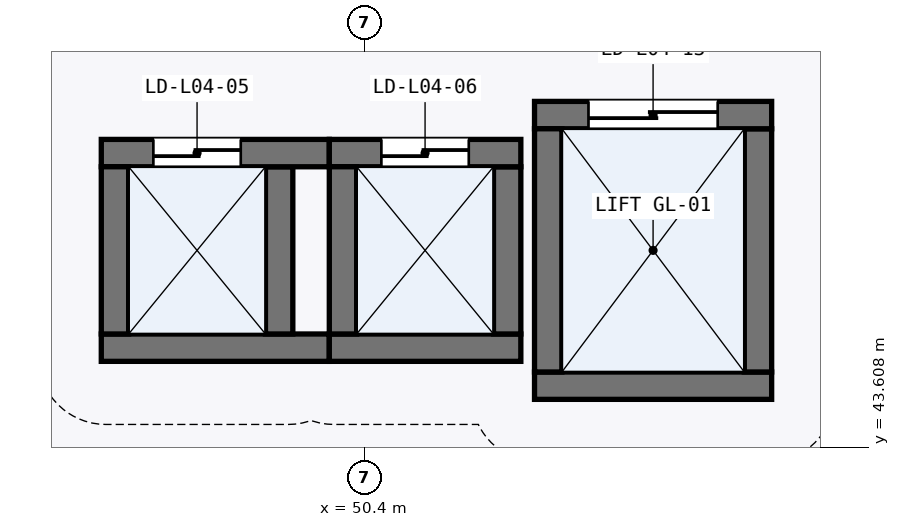
"""IFC4 building model, lengths in metres.
Left out: names, types, materials, properties, quantities, classifications, styles, units other than length and angle.
Written with IfcOpenShell. Run it as: python <this file> out.ifc"""

import sys

from ifc_helpers import new_model, si_unit, direction, frame, frame_2d, origin, place, context, subcontext, project, spatial, rectangle, extrude, element, fill, save


model = new_model("IFC4")
c1 = context("Model", 3, precision=1e-05, world=origin(), true_north=direction((0.0, 1.0)))
c2 = subcontext(c1, "Body", "Model", "MODEL_VIEW")
j1 = project(units=[si_unit("LENGTHUNIT", "METRE"), si_unit("PLANEANGLEUNIT", "RADIAN")], contexts=[c1])
p1 = place(None, origin())
s1 = spatial("IfcSite", under=j1, at=p1, CompositionType="ELEMENT")
p2 = place(p1, origin())
s2 = spatial("IfcBuilding", under=s1, at=p2, CompositionType="ELEMENT")
p3 = place(p2, frame((0.0, 0.0, 16.5)))
s3 = spatial("IfcBuildingStorey", under=s2, at=p3, CompositionType="ELEMENT", Elevation=16.5)
p4 = place(p3, frame((46.94, 44.92, 0.0), z_axis=(0.0, 0.0, 1.0), x_axis=(1.0, 0.0, 0.0)))
e1 = element("IfcWall", 1, at=p4, inside=s3, PredefinedType="SHEAR", context=c2, shape_type="SweptSolid", body=[
    extrude(rectangle(XDim=3.0, YDim=0.36, at=frame_2d((1.5, 0.0))), origin(), (0.0, 0.0, 1.0), 4.845),
])
p5 = place(p3, frame((49.28, 45.1, 0.0), z_axis=(0.0, 0.0, 1.0), x_axis=(0.0, 1.0, 0.0)))
e2 = element("IfcWall", 2, at=p5, inside=s3, PredefinedType="SHEAR", context=c2, shape_type="SweptSolid", body=[
    extrude(rectangle(XDim=2.2, YDim=0.36, at=frame_2d((1.1, 0.0))), origin(), (0.0, 0.0, 1.0), 4.845),
])
p6 = place(p3, frame((49.94, 47.48, 0.0), z_axis=(0.0, 0.0, 1.0), x_axis=(-1.0, 0.0, 0.0)))
e3 = element("IfcWall", 3, at=p6, inside=s3, PredefinedType="SHEAR", context=c2, shape_type="SweptSolid", body=[
    extrude(rectangle(XDim=3.0, YDim=0.36, at=frame_2d((1.5, 0.0))), origin(), (0.0, 0.0, 1.0), 4.845),
])
p7 = place(p6, frame((1.165, 0.0, 0.0)))
e4 = element("IfcOpeningElement", 4, at=p7, cuts=e3, PredefinedType="OPENING", context=c2, shape_type="SweptSolid", body=[
    extrude(rectangle(XDim=1.15, YDim=2.2, at=frame_2d((0.575, 1.1))), frame((0.0, 0.19, 0.0), z_axis=(0.0, -1.0, 0.0), x_axis=(1.0, 0.0, 0.0)), (0.0, 0.0, 1.0), 0.38),
])
p8 = place(p3, frame((47.12, 47.3, 0.0), z_axis=(0.0, 0.0, 1.0), x_axis=(0.0, -1.0, 0.0)))
e5 = element("IfcWall", 5, at=p8, inside=s3, PredefinedType="SHEAR", context=c2, shape_type="SweptSolid", body=[
    extrude(rectangle(XDim=2.2, YDim=0.36, at=frame_2d((1.1, 0.0))), origin(), (0.0, 0.0, 1.0), 4.845),
])
p9 = place(p3, frame((49.94, 44.92, 0.0), z_axis=(0.0, 0.0, 1.0), x_axis=(1.0, 0.0, 0.0)))
e6 = element("IfcWall", 6, at=p9, inside=s3, PredefinedType="SHEAR", context=c2, shape_type="SweptSolid", body=[
    extrude(rectangle(XDim=2.52, YDim=0.36, at=frame_2d((1.26, 0.0))), origin(), (0.0, 0.0, 1.0), 4.845),
])
p10 = place(p3, frame((52.28, 45.1, 0.0), z_axis=(0.0, 0.0, 1.0), x_axis=(0.0, 1.0, 0.0)))
e7 = element("IfcWall", 7, at=p10, inside=s3, PredefinedType="SHEAR", context=c2, shape_type="SweptSolid", body=[
    extrude(rectangle(XDim=2.2, YDim=0.36, at=frame_2d((1.1, 0.0))), origin(), (0.0, 0.0, 1.0), 4.845),
])
p11 = place(p3, frame((52.46, 47.48, 0.0), z_axis=(0.0, 0.0, 1.0), x_axis=(-1.0, 0.0, 0.0)))
e8 = element("IfcWall", 8, at=p11, inside=s3, PredefinedType="SHEAR", context=c2, shape_type="SweptSolid", body=[
    extrude(rectangle(XDim=2.52, YDim=0.36, at=frame_2d((1.26, 0.0))), origin(), (0.0, 0.0, 1.0), 4.845),
])
p12 = place(p11, frame((0.685, 0.0, 0.0)))
e9 = element("IfcOpeningElement", 9, at=p12, cuts=e8, PredefinedType="OPENING", context=c2, shape_type="SweptSolid", body=[
    extrude(rectangle(XDim=1.15, YDim=2.2, at=frame_2d((0.575, 1.1))), frame((0.0, 0.19, 0.0), z_axis=(0.0, -1.0, 0.0), x_axis=(1.0, 0.0, 0.0)), (0.0, 0.0, 1.0), 0.38),
])
p13 = place(p3, frame((50.12, 47.3, 0.0), z_axis=(0.0, 0.0, 1.0), x_axis=(0.0, -1.0, 0.0)))
e10 = element("IfcWall", 10, at=p13, inside=s3, PredefinedType="SHEAR", context=c2, shape_type="SweptSolid", body=[
    extrude(rectangle(XDim=2.2, YDim=0.36, at=frame_2d((1.1, 0.0))), origin(), (0.0, 0.0, 1.0), 4.845),
])
p14 = place(p3, frame((52.64, 44.42, 0.0), z_axis=(0.0, 0.0, 1.0), x_axis=(1.0, 0.0, 0.0)))
e11 = element("IfcWall", 11, at=p14, inside=s3, PredefinedType="SHEAR", context=c2, shape_type="SweptSolid", body=[
    extrude(rectangle(XDim=3.12, YDim=0.36, at=frame_2d((1.56, 0.0))), origin(), (0.0, 0.0, 1.0), 4.845),
])
p15 = place(p3, frame((55.58, 44.6, 0.0), z_axis=(0.0, 0.0, 1.0), x_axis=(0.0, 1.0, 0.0)))
e12 = element("IfcWall", 12, at=p15, inside=s3, PredefinedType="SHEAR", context=c2, shape_type="SweptSolid", body=[
    extrude(rectangle(XDim=3.2, YDim=0.36, at=frame_2d((1.6, 0.0))), origin(), (0.0, 0.0, 1.0), 4.845),
])
p16 = place(p3, frame((55.76, 47.98, 0.0), z_axis=(0.0, 0.0, 1.0), x_axis=(-1.0, 0.0, 0.0)))
e13 = element("IfcWall", 13, at=p16, inside=s3, PredefinedType="SHEAR", context=c2, shape_type="SweptSolid", body=[
    extrude(rectangle(XDim=3.12, YDim=0.36, at=frame_2d((1.56, 0.0))), origin(), (0.0, 0.0, 1.0), 4.845),
])
p17 = place(p16, frame((0.71, 0.0, 0.0)))
e14 = element("IfcOpeningElement", 14, at=p17, cuts=e13, PredefinedType="OPENING", context=c2, shape_type="SweptSolid", body=[
    extrude(rectangle(XDim=1.7, YDim=2.3, at=frame_2d((0.85, 1.15))), frame((0.0, 0.19, 0.0), z_axis=(0.0, -1.0, 0.0), x_axis=(1.0, 0.0, 0.0)), (0.0, 0.0, 1.0), 0.38),
])
p18 = place(p3, frame((52.82, 47.8, 0.0), z_axis=(0.0, 0.0, 1.0), x_axis=(0.0, -1.0, 0.0)))
e15 = element("IfcWall", 15, at=p18, inside=s3, PredefinedType="SHEAR", context=c2, shape_type="SweptSolid", body=[
    extrude(rectangle(XDim=3.2, YDim=0.36, at=frame_2d((1.6, 0.0))), origin(), (0.0, 0.0, 1.0), 4.845),
])
p19 = place(p7, frame((1.15, 0.0, 0.0), z_axis=(0.0, 0.0, 1.0), x_axis=(-1.0, 0.0, 0.0)))
e16 = element("IfcDoor", 16, at=p19, inside=s3, OperationType="DOUBLE_DOOR_SLIDING", PredefinedType="DOOR", context=c2, shape_type="SweptSolid", body=[
    extrude(rectangle(XDim=1.15, YDim=2.2, at=frame_2d((0.575, 1.1))), frame((0.0, 0.025, 0.0), z_axis=(0.0, -1.0, 0.0), x_axis=(1.0, 0.0, 0.0)), (0.0, 0.0, 1.0), 0.05),
])
fill(e4, e16)
p20 = place(p12, frame((1.15, 0.0, 0.0), z_axis=(0.0, 0.0, 1.0), x_axis=(-1.0, 0.0, 0.0)))
e17 = element("IfcDoor", 17, at=p20, inside=s3, OperationType="DOUBLE_DOOR_SLIDING", PredefinedType="DOOR", context=c2, shape_type="SweptSolid", body=[
    extrude(rectangle(XDim=1.15, YDim=2.2, at=frame_2d((0.575, 1.1))), frame((0.0, 0.025, 0.0), z_axis=(0.0, -1.0, 0.0), x_axis=(1.0, 0.0, 0.0)), (0.0, 0.0, 1.0), 0.05),
])
fill(e9, e17)
p21 = place(p17, frame((1.7, 0.0, 0.0), z_axis=(0.0, 0.0, 1.0), x_axis=(-1.0, 0.0, 0.0)))
e18 = element("IfcDoor", 18, at=p21, inside=s3, OperationType="DOUBLE_DOOR_SLIDING", PredefinedType="DOOR", context=c2, shape_type="SweptSolid", body=[
    extrude(rectangle(XDim=1.7, YDim=2.3, at=frame_2d((0.85, 1.15))), frame((0.0, 0.025, 0.0), z_axis=(0.0, -1.0, 0.0), x_axis=(1.0, 0.0, 0.0)), (0.0, 0.0, 1.0), 0.05),
])
fill(e14, e18)
save(model, sys.argv[1])
